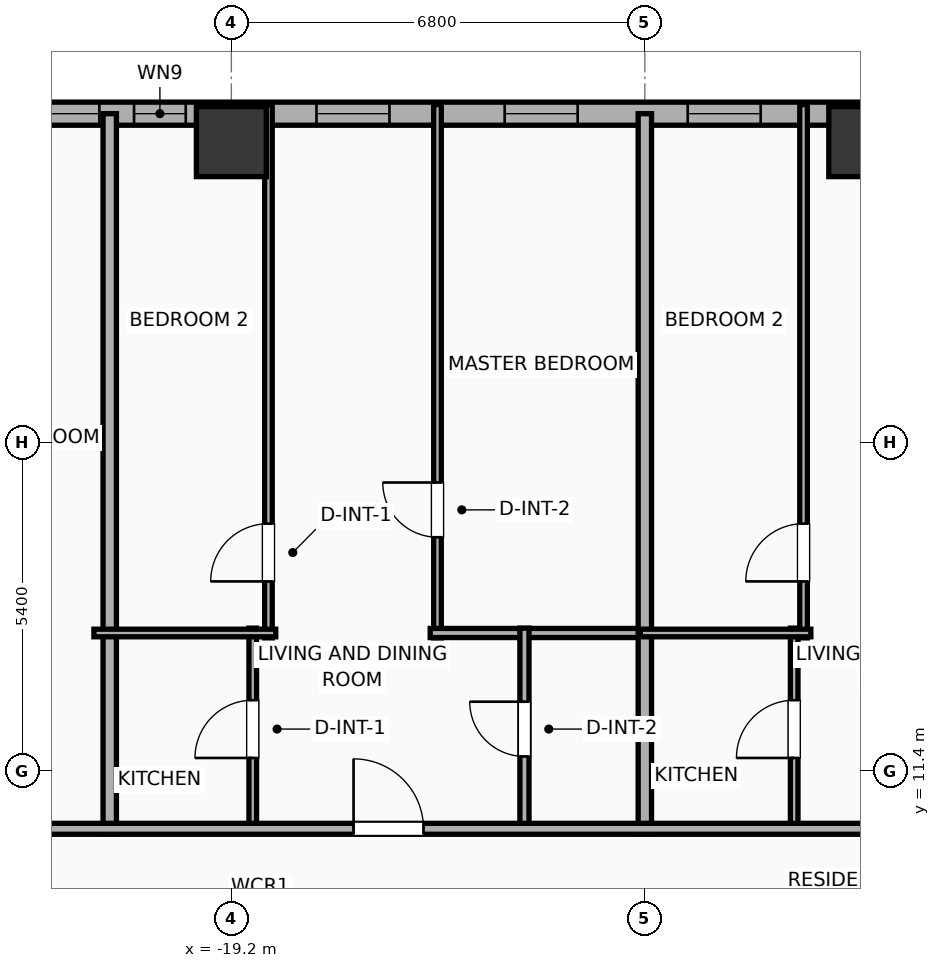
"""IFC4 building model, lengths in metres.
Left out: names, types, materials, properties, quantities, classifications, styles, units other than length and angle.
Written with IfcOpenShell. Run it as: python <this file> out.ifc"""

import sys

from ifc_helpers import new_model, si_unit, direction, frame, frame_2d, origin, origin_2d, place, context, subcontext, project, spatial, rectangle, hollow_rectangle, extrude, element, fill, save


model = new_model("IFC4")
c1 = context("Model", 3, precision=1e-05, world=origin(), true_north=direction((0.0, 1.0)))
c2 = subcontext(c1, "Body", "Model", "MODEL_VIEW")
j1 = project(units=[si_unit("LENGTHUNIT", "METRE"), si_unit("PLANEANGLEUNIT", "RADIAN")], contexts=[c1])
p1 = place(None, origin())
s1 = spatial("IfcSite", under=j1, at=p1, CompositionType="ELEMENT")
p2 = place(p1, origin())
s2 = spatial("IfcBuilding", under=s1, at=p2, CompositionType="ELEMENT")
p3 = place(p2, frame((0.0, 0.0, 72.8)))
s3 = spatial("IfcBuildingStorey", under=s2, at=p3, CompositionType="ELEMENT", Elevation=72.8)
for number, where, z_axis, x_axis in (
    (1, (-8.8, 21.75, 0.0), (0.0, 0.0, 1.0), (1.0, 0.0, 0.0)),
    (2, (-19.2, 21.75, 0.0), (0.0, 0.0, 1.0), (1.0, 0.0, 0.0)),
):
    element("IfcColumn", number, at=place(p3, frame(where, z_axis=z_axis, x_axis=x_axis)), inside=s3, PredefinedType="COLUMN", context=c2, shape_type="SweptSolid", body=[
        extrude(hollow_rectangle(XDim=1.15, YDim=1.15, WallThickness=0.04, at=origin_2d()), origin(), (0.0, 0.0, 1.0), 3.9),
    ])
p4 = place(p3, frame((-29.581, 22.21, 0.0), z_axis=(0.0, 0.0, 1.0), x_axis=(1.0, 0.0, 0.0)))
e3 = element("IfcWall", 3, at=p4, inside=s3, PredefinedType="ELEMENTEDWALL", context=c2, shape_type="SweptSolid", body=[
    extrude(rectangle(XDim=51.963, YDim=0.38, at=frame_2d((25.981, 0.0))), origin(), (0.0, 0.0, 1.0), 3.65),
])
p5 = place(p4, frame((5.81, 0.0, 0.75)))
e4 = element("IfcOpeningElement", 4, at=p5, cuts=e3, PredefinedType="OPENING", context=c2, shape_type="SweptSolid", body=[
    extrude(rectangle(XDim=2.4, YDim=2.1, at=frame_2d((1.2, 1.05))), frame((0.0, 0.2, 0.0), z_axis=(0.0, -1.0, 0.0), x_axis=(1.0, 0.0, 0.0)), (0.0, 0.0, 1.0), 0.4),
])
p6 = place(p4, frame((23.131, 0.0, 0.75)))
e5 = element("IfcOpeningElement", 5, at=p6, cuts=e3, PredefinedType="OPENING", context=c2, shape_type="SweptSolid", body=[
    extrude(rectangle(XDim=2.4, YDim=2.1, at=frame_2d((1.2, 1.05))), frame((0.0, 0.2, 0.0), z_axis=(0.0, -1.0, 0.0), x_axis=(1.0, 0.0, 0.0)), (0.0, 0.0, 1.0), 0.4),
])
p7 = place(p4, frame((43.752, 0.0, 0.75)))
e6 = element("IfcOpeningElement", 6, at=p7, cuts=e3, PredefinedType="OPENING", context=c2, shape_type="SweptSolid", body=[
    extrude(rectangle(XDim=2.4, YDim=2.1, at=frame_2d((1.2, 1.05))), frame((0.0, 0.2, 0.0), z_axis=(0.0, -1.0, 0.0), x_axis=(1.0, 0.0, 0.0)), (0.0, 0.0, 1.0), 0.4),
])
p8 = place(p4, frame((2.819, 0.0, 0.75)))
e7 = element("IfcOpeningElement", 7, at=p8, cuts=e3, PredefinedType="OPENING", context=c2, shape_type="SweptSolid", body=[
    extrude(rectangle(XDim=1.2, YDim=2.05, at=frame_2d((0.6, 1.025))), frame((0.0, 0.2, 0.0), z_axis=(0.0, -1.0, 0.0), x_axis=(1.0, 0.0, 0.0)), (0.0, 0.0, 1.0), 0.4),
])
p9 = place(p4, frame((11.781, 0.0, 0.75)))
e8 = element("IfcOpeningElement", 8, at=p9, cuts=e3, PredefinedType="OPENING", context=c2, shape_type="SweptSolid", body=[
    extrude(rectangle(XDim=1.2, YDim=2.05, at=frame_2d((0.6, 1.025))), frame((0.0, 0.2, 0.0), z_axis=(0.0, -1.0, 0.0), x_axis=(1.0, 0.0, 0.0)), (0.0, 0.0, 1.0), 0.4),
])
p10 = place(p4, frame((8.781, 0.0, 0.75)))
e9 = element("IfcOpeningElement", 9, at=p10, cuts=e3, PredefinedType="OPENING", context=c2, shape_type="SweptSolid", body=[
    extrude(rectangle(XDim=0.85, YDim=2.05, at=frame_2d((0.425, 1.025))), frame((0.0, 0.2, 0.0), z_axis=(0.0, -1.0, 0.0), x_axis=(1.0, 0.0, 0.0)), (0.0, 0.0, 1.0), 0.4),
])
p11 = place(p4, frame((14.876, 0.0, 0.75)))
e10 = element("IfcOpeningElement", 10, at=p11, cuts=e3, PredefinedType="OPENING", context=c2, shape_type="SweptSolid", body=[
    extrude(rectangle(XDim=1.2, YDim=2.05, at=frame_2d((0.6, 1.025))), frame((0.0, 0.2, 0.0), z_axis=(0.0, -1.0, 0.0), x_axis=(1.0, 0.0, 0.0)), (0.0, 0.0, 1.0), 0.4),
])
p12 = place(p4, frame((21.521, 0.0, 0.75)))
e11 = element("IfcOpeningElement", 11, at=p12, cuts=e3, PredefinedType="OPENING", context=c2, shape_type="SweptSolid", body=[
    extrude(rectangle(XDim=0.52, YDim=2.05, at=frame_2d((0.26, 1.025))), frame((0.0, 0.2, 0.0), z_axis=(0.0, -1.0, 0.0), x_axis=(1.0, 0.0, 0.0)), (0.0, 0.0, 1.0), 0.4),
])
p13 = place(p4, frame((17.886, 0.0, 0.75)))
e12 = element("IfcOpeningElement", 12, at=p13, cuts=e3, PredefinedType="OPENING", context=c2, shape_type="SweptSolid", body=[
    extrude(rectangle(XDim=1.2, YDim=2.05, at=frame_2d((0.6, 1.025))), frame((0.0, 0.2, 0.0), z_axis=(0.0, -1.0, 0.0), x_axis=(1.0, 0.0, 0.0)), (0.0, 0.0, 1.0), 0.4),
])
p14 = place(p4, frame((26.736, 0.0, 0.75)))
e13 = element("IfcOpeningElement", 13, at=p14, cuts=e3, PredefinedType="OPENING", context=c2, shape_type="SweptSolid", body=[
    extrude(rectangle(XDim=1.2, YDim=2.05, at=frame_2d((0.6, 1.025))), frame((0.0, 0.2, 0.0), z_axis=(0.0, -1.0, 0.0), x_axis=(1.0, 0.0, 0.0)), (0.0, 0.0, 1.0), 0.4),
])
p15 = place(p4, frame((31.976, 0.0, 0.75)))
e14 = element("IfcOpeningElement", 14, at=p15, cuts=e3, PredefinedType="OPENING", context=c2, shape_type="SweptSolid", body=[
    extrude(rectangle(XDim=1.2, YDim=2.05, at=frame_2d((0.6, 1.025))), frame((0.0, 0.2, 0.0), z_axis=(0.0, -1.0, 0.0), x_axis=(1.0, 0.0, 0.0)), (0.0, 0.0, 1.0), 0.4),
])
p16 = place(p4, frame((38.181, 0.0, 0.75)))
e15 = element("IfcOpeningElement", 15, at=p16, cuts=e3, PredefinedType="OPENING", context=c2, shape_type="SweptSolid", body=[
    extrude(rectangle(XDim=1.2, YDim=2.05, at=frame_2d((0.6, 1.025))), frame((0.0, 0.2, 0.0), z_axis=(0.0, -1.0, 0.0), x_axis=(1.0, 0.0, 0.0)), (0.0, 0.0, 1.0), 0.4),
])
p17 = place(p4, frame((35.486, 0.0, 0.75)))
e16 = element("IfcOpeningElement", 16, at=p17, cuts=e3, PredefinedType="OPENING", context=c2, shape_type="SweptSolid", body=[
    extrude(rectangle(XDim=1.2, YDim=2.05, at=frame_2d((0.6, 1.025))), frame((0.0, 0.2, 0.0), z_axis=(0.0, -1.0, 0.0), x_axis=(1.0, 0.0, 0.0)), (0.0, 0.0, 1.0), 0.4),
])
p18 = place(p4, frame((42.411, 0.0, 0.75)))
e17 = element("IfcOpeningElement", 17, at=p18, cuts=e3, PredefinedType="OPENING", context=c2, shape_type="SweptSolid", body=[
    extrude(rectangle(XDim=0.85, YDim=2.05, at=frame_2d((0.425, 1.025))), frame((0.0, 0.2, 0.0), z_axis=(0.0, -1.0, 0.0), x_axis=(1.0, 0.0, 0.0)), (0.0, 0.0, 1.0), 0.4),
])
p19 = place(p4, frame((47.943, 0.0, 0.75)))
e18 = element("IfcOpeningElement", 18, at=p19, cuts=e3, PredefinedType="OPENING", context=c2, shape_type="SweptSolid", body=[
    extrude(rectangle(XDim=1.2, YDim=2.05, at=frame_2d((0.6, 1.025))), frame((0.0, 0.2, 0.0), z_axis=(0.0, -1.0, 0.0), x_axis=(1.0, 0.0, 0.0)), (0.0, 0.0, 1.0), 0.4),
])
p20 = place(p4, frame((49.901, 0.0, 0.75)))
e19 = element("IfcOpeningElement", 19, at=p20, cuts=e3, PredefinedType="OPENING", context=c2, shape_type="SweptSolid", body=[
    extrude(rectangle(XDim=1.2, YDim=2.05, at=frame_2d((0.6, 1.025))), frame((0.0, 0.2, 0.0), z_axis=(0.0, -1.0, 0.0), x_axis=(1.0, 0.0, 0.0)), (0.0, 0.0, 1.0), 0.4),
])
p21 = place(p3, frame((-21.2, 10.37, 0.0), z_axis=(0.0, 0.0, 1.0), x_axis=(0.0, 1.0, 0.0)))
e20 = element("IfcWall", 20, at=p21, inside=s3, PredefinedType="PARTITIONING", context=c2, shape_type="SweptSolid", body=[
    extrude(rectangle(XDim=11.84, YDim=0.22, at=frame_2d((5.92, 0.0))), origin(), (0.0, 0.0, 1.0), 3.65),
])
p22 = place(p3, frame((-18.59, 13.59, 0.0), z_axis=(0.0, 0.0, 1.0), x_axis=(0.0, 1.0, 0.0)))
e21 = element("IfcWall", 21, at=p22, inside=s3, PredefinedType="PARTITIONING", context=c2, shape_type="SweptSolid", body=[
    extrude(rectangle(XDim=8.77, YDim=0.125, at=frame_2d((4.385, 0.0))), origin(), (0.0, 0.0, 1.0), 3.65),
])
p23 = place(p22, frame((0.928, 0.0, 0.0)))
e22 = element("IfcOpeningElement", 22, at=p23, cuts=e21, PredefinedType="OPENING", context=c2, shape_type="SweptSolid", body=[
    extrude(rectangle(XDim=0.95, YDim=2.05, at=frame_2d((0.475, 1.025))), frame((0.0, 0.073, 0.0), z_axis=(0.0, -1.0, 0.0), x_axis=(1.0, 0.0, 0.0)), (0.0, 0.0, 1.0), 0.145),
])
p24 = place(p3, frame((-15.81, 13.59, 0.0), z_axis=(0.0, 0.0, 1.0), x_axis=(0.0, 1.0, 0.0)))
e23 = element("IfcWall", 23, at=p24, inside=s3, PredefinedType="PARTITIONING", context=c2, shape_type="SweptSolid", body=[
    extrude(rectangle(XDim=8.77, YDim=0.125, at=frame_2d((4.385, 0.0))), origin(), (0.0, 0.0, 1.0), 3.65),
])
p25 = place(p24, frame((1.655, 0.0, 0.0)))
e24 = element("IfcOpeningElement", 24, at=p25, cuts=e23, PredefinedType="OPENING", context=c2, shape_type="SweptSolid", body=[
    extrude(rectangle(XDim=0.9, YDim=2.05, at=frame_2d((0.45, 1.025))), frame((0.0, 0.073, 0.0), z_axis=(0.0, -1.0, 0.0), x_axis=(1.0, 0.0, 0.0)), (0.0, 0.0, 1.0), 0.145),
])
p26 = place(p3, frame((-15.93, 13.67, 0.0), z_axis=(0.0, 0.0, 1.0), x_axis=(1.0, 0.0, 0.0)))
e25 = element("IfcWall", 25, at=p26, inside=s3, PredefinedType="PLUMBINGWALL", context=c2, shape_type="SweptSolid", body=[
    extrude(rectangle(XDim=3.605, YDim=0.15, at=frame_2d((1.802, 0.0))), origin(), (0.0, 0.0, 1.0), 3.65),
])
p27 = place(p3, frame((-18.848, 10.43, 0.0), z_axis=(0.0, 0.0, 1.0), x_axis=(0.0, 1.0, 0.0)))
e26 = element("IfcWall", 26, at=p27, inside=s3, PredefinedType="PARTITIONING", context=c2, shape_type="SweptSolid", body=[
    extrude(rectangle(XDim=3.32, YDim=0.125, at=frame_2d((1.66, 0.0))), origin(), (0.0, 0.0, 1.0), 3.65),
])
p28 = place(p27, frame((1.185, 0.0, 0.0)))
e27 = element("IfcOpeningElement", 27, at=p28, cuts=e26, PredefinedType="OPENING", context=c2, shape_type="SweptSolid", body=[
    extrude(rectangle(XDim=0.95, YDim=2.05, at=frame_2d((0.475, 1.025))), frame((0.0, 0.073, 0.0), z_axis=(0.0, -1.0, 0.0), x_axis=(1.0, 0.0, 0.0)), (0.0, 0.0, 1.0), 0.145),
])
p29 = place(p3, frame((-21.46, 13.67, 0.0), z_axis=(0.0, 0.0, 1.0), x_axis=(1.0, 0.0, 0.0)))
e28 = element("IfcWall", 28, at=p29, inside=s3, PredefinedType="PARTITIONING", context=c2, shape_type="SweptSolid", body=[
    extrude(rectangle(XDim=2.99, YDim=0.125, at=frame_2d((1.495, 0.0))), origin(), (0.0, 0.0, 1.0), 3.65),
])
p30 = place(p3, frame((-14.38, 10.43, 0.0), z_axis=(0.0, 0.0, 1.0), x_axis=(0.0, 1.0, 0.0)))
e29 = element("IfcWall", 29, at=p30, inside=s3, PredefinedType="PLUMBINGWALL", context=c2, shape_type="SweptSolid", body=[
    extrude(rectangle(XDim=3.32, YDim=0.15, at=frame_2d((1.66, 0.0))), origin(), (0.0, 0.0, 1.0), 3.65),
])
p31 = place(p30, frame((1.21, 0.0, 0.0)))
e30 = element("IfcOpeningElement", 30, at=p31, cuts=e29, PredefinedType="OPENING", context=c2, shape_type="SweptSolid", body=[
    extrude(rectangle(XDim=0.9, YDim=2.05, at=frame_2d((0.45, 1.025))), frame((0.0, 0.085, 0.0), z_axis=(0.0, -1.0, 0.0), x_axis=(1.0, 0.0, 0.0)), (0.0, 0.0, 1.0), 0.17),
])
p32 = place(p3, frame((-12.4, 10.37, 0.0), z_axis=(0.0, 0.0, 1.0), x_axis=(0.0, 1.0, 0.0)))
e31 = element("IfcWall", 31, at=p32, inside=s3, PredefinedType="PARTITIONING", context=c2, shape_type="SweptSolid", body=[
    extrude(rectangle(XDim=11.84, YDim=0.22, at=frame_2d((5.92, 0.0))), origin(), (0.0, 0.0, 1.0), 3.65),
])
p33 = place(p3, frame((-9.79, 13.59, 0.0), z_axis=(0.0, 0.0, 1.0), x_axis=(0.0, 1.0, 0.0)))
e32 = element("IfcWall", 32, at=p33, inside=s3, PredefinedType="PARTITIONING", context=c2, shape_type="SweptSolid", body=[
    extrude(rectangle(XDim=8.77, YDim=0.125, at=frame_2d((4.385, 0.0))), origin(), (0.0, 0.0, 1.0), 2.94),
])
p34 = place(p33, frame((0.928, 0.0, 0.0)))
e33 = element("IfcOpeningElement", 33, at=p34, cuts=e32, PredefinedType="OPENING", context=c2, shape_type="SweptSolid", body=[
    extrude(rectangle(XDim=0.95, YDim=2.05, at=frame_2d((0.475, 1.025))), frame((0.0, 0.073, 0.0), z_axis=(0.0, -1.0, 0.0), x_axis=(1.0, 0.0, 0.0)), (0.0, 0.0, 1.0), 0.145),
])
p35 = place(p3, frame((-9.944, 10.43, 0.0), z_axis=(0.0, 0.0, 1.0), x_axis=(0.0, 1.0, 0.0)))
e34 = element("IfcWall", 34, at=p35, inside=s3, PredefinedType="PARTITIONING", context=c2, shape_type="SweptSolid", body=[
    extrude(rectangle(XDim=3.32, YDim=0.125, at=frame_2d((1.66, 0.0))), origin(), (0.0, 0.0, 1.0), 3.65),
])
p36 = place(p35, frame((1.185, 0.0, 0.0)))
e35 = element("IfcOpeningElement", 35, at=p36, cuts=e34, PredefinedType="OPENING", context=c2, shape_type="SweptSolid", body=[
    extrude(rectangle(XDim=0.95, YDim=2.05, at=frame_2d((0.475, 1.025))), frame((0.0, 0.073, 0.0), z_axis=(0.0, -1.0, 0.0), x_axis=(1.0, 0.0, 0.0)), (0.0, 0.0, 1.0), 0.145),
])
p37 = place(p3, frame((-12.475, 13.67, 0.0), z_axis=(0.0, 0.0, 1.0), x_axis=(1.0, 0.0, 0.0)))
e36 = element("IfcWall", 36, at=p37, inside=s3, PredefinedType="PARTITIONING", context=c2, shape_type="SweptSolid", body=[
    extrude(rectangle(XDim=2.805, YDim=0.125, at=frame_2d((1.403, 0.0))), origin(), (0.0, 0.0, 1.0), 3.65),
])
p38 = place(p3, frame((-33.41, 10.45, 0.0), z_axis=(0.0, 0.0, 1.0), x_axis=(1.0, 0.0, 0.0)))
e37 = element("IfcWall", 37, at=p38, inside=s3, PredefinedType="PARTITIONING", context=c2, shape_type="SweptSolid", body=[
    extrude(rectangle(XDim=59.62, YDim=0.18, at=frame_2d((29.81, 0.0))), origin(), (0.0, 0.0, 1.0), 3.65),
])
p39 = place(p38, frame((2.686, 0.0, 0.0)))
e38 = element("IfcOpeningElement", 38, at=p39, cuts=e37, PredefinedType="OPENING", context=c2, shape_type="SweptSolid", body=[
    extrude(rectangle(XDim=0.9, YDim=2.05, at=frame_2d((0.45, 1.025))), frame((0.0, 0.1, 0.0), z_axis=(0.0, -1.0, 0.0), x_axis=(1.0, 0.0, 0.0)), (0.0, 0.0, 1.0), 0.2),
])
p40 = place(p38, frame((9.698, 0.0, 0.0)))
e39 = element("IfcOpeningElement", 39, at=p40, cuts=e37, PredefinedType="OPENING", context=c2, shape_type="SweptSolid", body=[
    extrude(rectangle(XDim=1.15, YDim=2.05, at=frame_2d((0.575, 1.025))), frame((0.0, 0.1, 0.0), z_axis=(0.0, -1.0, 0.0), x_axis=(1.0, 0.0, 0.0)), (0.0, 0.0, 1.0), 0.2),
])
p41 = place(p38, frame((16.22, 0.0, 0.0)))
e40 = element("IfcOpeningElement", 40, at=p41, cuts=e37, PredefinedType="OPENING", context=c2, shape_type="SweptSolid", body=[
    extrude(rectangle(XDim=1.15, YDim=2.05, at=frame_2d((0.575, 1.025))), frame((0.0, 0.1, 0.0), z_axis=(0.0, -1.0, 0.0), x_axis=(1.0, 0.0, 0.0)), (0.0, 0.0, 1.0), 0.2),
])
p42 = place(p38, frame((25.073, 0.0, 0.0)))
e41 = element("IfcOpeningElement", 41, at=p42, cuts=e37, PredefinedType="OPENING", context=c2, shape_type="SweptSolid", body=[
    extrude(rectangle(XDim=1.15, YDim=2.05, at=frame_2d((0.575, 1.025))), frame((0.0, 0.1, 0.0), z_axis=(0.0, -1.0, 0.0), x_axis=(1.0, 0.0, 0.0)), (0.0, 0.0, 1.0), 0.2),
])
p43 = place(p38, frame((33.605, 0.0, 0.0)))
e42 = element("IfcOpeningElement", 42, at=p43, cuts=e37, PredefinedType="OPENING", context=c2, shape_type="SweptSolid", body=[
    extrude(rectangle(XDim=1.15, YDim=2.05, at=frame_2d((0.575, 1.025))), frame((0.0, 0.1, 0.0), z_axis=(0.0, -1.0, 0.0), x_axis=(1.0, 0.0, 0.0)), (0.0, 0.0, 1.0), 0.2),
])
p44 = place(p38, frame((42.649, 0.0, 0.0)))
e43 = element("IfcOpeningElement", 43, at=p44, cuts=e37, PredefinedType="OPENING", context=c2, shape_type="SweptSolid", body=[
    extrude(rectangle(XDim=1.15, YDim=2.05, at=frame_2d((0.575, 1.025))), frame((0.0, 0.1, 0.0), z_axis=(0.0, -1.0, 0.0), x_axis=(1.0, 0.0, 0.0)), (0.0, 0.0, 1.0), 0.2),
])
p45 = place(p38, frame((48.772, 0.0, 0.0)))
e44 = element("IfcOpeningElement", 44, at=p45, cuts=e37, PredefinedType="OPENING", context=c2, shape_type="SweptSolid", body=[
    extrude(rectangle(XDim=1.15, YDim=2.05, at=frame_2d((0.575, 1.025))), frame((0.0, 0.1, 0.0), z_axis=(0.0, -1.0, 0.0), x_axis=(1.0, 0.0, 0.0)), (0.0, 0.0, 1.0), 0.2),
])
p46 = place(p38, frame((56.272, 0.0, 0.0)))
e45 = element("IfcOpeningElement", 45, at=p46, cuts=e37, PredefinedType="OPENING", context=c2, shape_type="SweptSolid", body=[
    extrude(rectangle(XDim=0.9, YDim=2.05, at=frame_2d((0.45, 1.025))), frame((0.0, 0.1, 0.0), z_axis=(0.0, -1.0, 0.0), x_axis=(1.0, 0.0, 0.0)), (0.0, 0.0, 1.0), 0.2),
])
p47 = place(p5, origin())
e46 = element("IfcWindow", 46, at=p47, inside=s3, PartitioningType="SINGLE_PANEL", PredefinedType="WINDOW", context=c2, shape_type="SweptSolid", body=[
    extrude(rectangle(XDim=2.4, YDim=2.1, at=frame_2d((1.2, 1.05))), frame((0.0, 0.03, 0.0), z_axis=(0.0, -1.0, 0.0), x_axis=(1.0, 0.0, 0.0)), (0.0, 0.0, 1.0), 0.06),
])
fill(e4, e46)
p48 = place(p9, origin())
e47 = element("IfcWindow", 47, at=p48, inside=s3, PartitioningType="SINGLE_PANEL", PredefinedType="WINDOW", context=c2, shape_type="SweptSolid", body=[
    extrude(rectangle(XDim=1.2, YDim=2.05, at=frame_2d((0.6, 1.025))), frame((0.0, 0.03, 0.0), z_axis=(0.0, -1.0, 0.0), x_axis=(1.0, 0.0, 0.0)), (0.0, 0.0, 1.0), 0.06),
])
fill(e8, e47)
p49 = place(p10, origin())
e48 = element("IfcWindow", 48, at=p49, inside=s3, PartitioningType="SINGLE_PANEL", PredefinedType="WINDOW", context=c2, shape_type="SweptSolid", body=[
    extrude(rectangle(XDim=0.85, YDim=2.05, at=frame_2d((0.425, 1.025))), frame((0.0, 0.03, 0.0), z_axis=(0.0, -1.0, 0.0), x_axis=(1.0, 0.0, 0.0)), (0.0, 0.0, 1.0), 0.06),
])
fill(e9, e48)
p50 = place(p11, origin())
e49 = element("IfcWindow", 49, at=p50, inside=s3, PartitioningType="SINGLE_PANEL", PredefinedType="WINDOW", context=c2, shape_type="SweptSolid", body=[
    extrude(rectangle(XDim=1.2, YDim=2.05, at=frame_2d((0.6, 1.025))), frame((0.0, 0.03, 0.0), z_axis=(0.0, -1.0, 0.0), x_axis=(1.0, 0.0, 0.0)), (0.0, 0.0, 1.0), 0.06),
])
fill(e10, e49)
p51 = place(p13, origin())
e50 = element("IfcWindow", 50, at=p51, inside=s3, PartitioningType="SINGLE_PANEL", PredefinedType="WINDOW", context=c2, shape_type="SweptSolid", body=[
    extrude(rectangle(XDim=1.2, YDim=2.05, at=frame_2d((0.6, 1.025))), frame((0.0, 0.03, 0.0), z_axis=(0.0, -1.0, 0.0), x_axis=(1.0, 0.0, 0.0)), (0.0, 0.0, 1.0), 0.06),
])
fill(e12, e50)
p52 = place(p23, origin())
e51 = element("IfcDoor", 51, at=p52, inside=s3, OperationType="SINGLE_SWING_LEFT", PredefinedType="DOOR", context=c2, shape_type="SweptSolid", body=[
    extrude(rectangle(XDim=0.95, YDim=2.05, at=frame_2d((0.475, 1.025))), frame((0.0, 0.025, 0.0), z_axis=(0.0, -1.0, 0.0), x_axis=(1.0, 0.0, 0.0)), (0.0, 0.0, 1.0), 0.05),
])
fill(e22, e51)
p53 = place(p25, origin())
e52 = element("IfcDoor", 52, at=p53, inside=s3, OperationType="SINGLE_SWING_RIGHT", PredefinedType="DOOR", context=c2, shape_type="SweptSolid", body=[
    extrude(rectangle(XDim=0.9, YDim=2.05, at=frame_2d((0.45, 1.025))), frame((0.0, 0.025, 0.0), z_axis=(0.0, -1.0, 0.0), x_axis=(1.0, 0.0, 0.0)), (0.0, 0.0, 1.0), 0.05),
])
fill(e24, e52)
p54 = place(p28, origin())
e53 = element("IfcDoor", 53, at=p54, inside=s3, OperationType="SINGLE_SWING_LEFT", PredefinedType="DOOR", context=c2, shape_type="SweptSolid", body=[
    extrude(rectangle(XDim=0.95, YDim=2.05, at=frame_2d((0.475, 1.025))), frame((0.0, 0.025, 0.0), z_axis=(0.0, -1.0, 0.0), x_axis=(1.0, 0.0, 0.0)), (0.0, 0.0, 1.0), 0.05),
])
fill(e27, e53)
p55 = place(p31, origin())
e54 = element("IfcDoor", 54, at=p55, inside=s3, OperationType="SINGLE_SWING_RIGHT", PredefinedType="DOOR", context=c2, shape_type="SweptSolid", body=[
    extrude(rectangle(XDim=0.9, YDim=2.05, at=frame_2d((0.45, 1.025))), frame((0.0, 0.025, 0.0), z_axis=(0.0, -1.0, 0.0), x_axis=(1.0, 0.0, 0.0)), (0.0, 0.0, 1.0), 0.05),
])
fill(e30, e54)
p56 = place(p34, origin())
e55 = element("IfcDoor", 55, at=p56, inside=s3, OperationType="SINGLE_SWING_LEFT", PredefinedType="DOOR", context=c2, shape_type="SweptSolid", body=[
    extrude(rectangle(XDim=0.95, YDim=2.05, at=frame_2d((0.475, 1.025))), frame((0.0, 0.025, 0.0), z_axis=(0.0, -1.0, 0.0), x_axis=(1.0, 0.0, 0.0)), (0.0, 0.0, 1.0), 0.05),
])
fill(e33, e55)
p57 = place(p36, origin())
e56 = element("IfcDoor", 56, at=p57, inside=s3, OperationType="SINGLE_SWING_LEFT", PredefinedType="DOOR", context=c2, shape_type="SweptSolid", body=[
    extrude(rectangle(XDim=0.95, YDim=2.05, at=frame_2d((0.475, 1.025))), frame((0.0, 0.025, 0.0), z_axis=(0.0, -1.0, 0.0), x_axis=(1.0, 0.0, 0.0)), (0.0, 0.0, 1.0), 0.05),
])
fill(e35, e56)
p58 = place(p41, origin())
e57 = element("IfcDoor", 57, at=p58, inside=s3, OperationType="SINGLE_SWING_LEFT", PredefinedType="DOOR", context=c2, shape_type="SweptSolid", body=[
    extrude(rectangle(XDim=1.15, YDim=2.05, at=frame_2d((0.575, 1.025))), frame((0.0, 0.025, 0.0), z_axis=(0.0, -1.0, 0.0), x_axis=(1.0, 0.0, 0.0)), (0.0, 0.0, 1.0), 0.05),
])
fill(e40, e57)
save(model, sys.argv[1])
